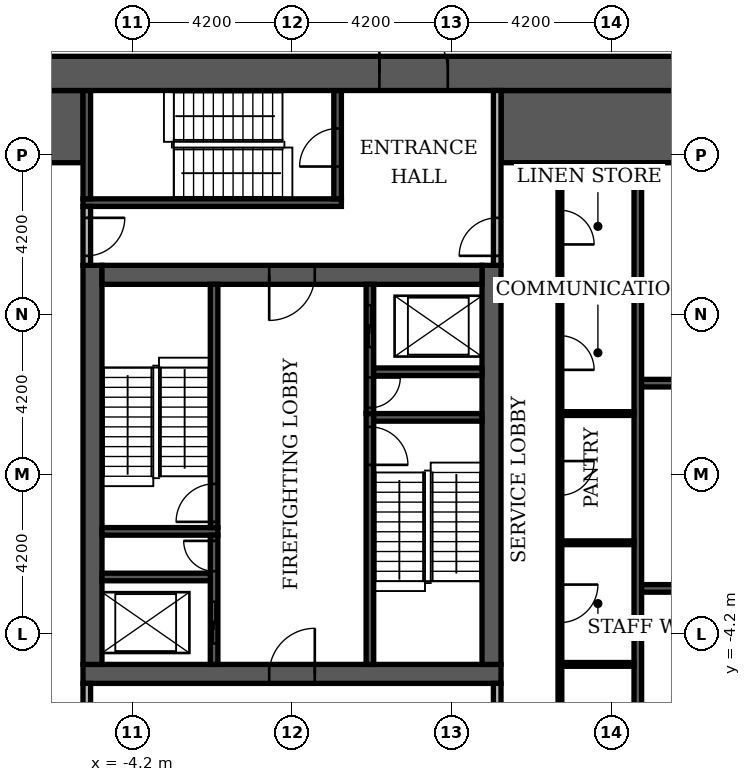
"""IFC4 building model, lengths in metres.
Left out: names, types, materials, properties, quantities, classifications, styles, units other than length and angle.
Written with IfcOpenShell. Run it as: python <this file> out.ifc"""

import sys

from ifc_helpers import new_model, si_unit, direction, frame, frame_2d, origin, place, context, subcontext, project, spatial, rectangle, extrude, element, fill, save


model = new_model("IFC4")
c1 = context("Model", 3, precision=1e-05, world=origin(), true_north=direction((0.0, 1.0)))
c2 = subcontext(c1, "Body", "Model", "MODEL_VIEW")
j1 = project(units=[si_unit("LENGTHUNIT", "METRE"), si_unit("PLANEANGLEUNIT", "RADIAN")], contexts=[c1])
p1 = place(None, origin())
s1 = spatial("IfcSite", under=j1, at=p1, CompositionType="ELEMENT")
p2 = place(p1, origin())
s2 = spatial("IfcBuilding", under=s1, at=p2, CompositionType="ELEMENT")
p3 = place(p2, frame((0.0, 0.0, -8.4)))
s3 = spatial("IfcBuildingStorey", under=s2, at=p3, CompositionType="ELEMENT", Elevation=-8.4)
p4 = place(p3, frame((-5.5, -5.25, 0.0), z_axis=(0.0, 0.0, 1.0), x_axis=(1.0, 0.0, 0.0)))
e1 = element("IfcWall", 1, at=p4, inside=s3, PredefinedType="SHEAR", context=c2, shape_type="SweptSolid", body=[
    extrude(rectangle(XDim=11.0, YDim=0.5, at=frame_2d((5.5, 0.0))), origin(), (0.0, 0.0, 1.0), 3.85),
])
p5 = place(p4, frame((4.9, 0.0, 0.0)))
e2 = element("IfcOpeningElement", 2, at=p5, cuts=e1, PredefinedType="OPENING", context=c2, shape_type="SweptSolid", body=[
    extrude(rectangle(XDim=1.2, YDim=2.1, at=frame_2d((0.6, 1.05))), frame((0.0, 0.26, 0.0), z_axis=(0.0, -1.0, 0.0), x_axis=(1.0, 0.0, 0.0)), (0.0, 0.0, 1.0), 0.52),
])
for number, where, z_axis, x_axis in (
    (3, (-5.25, -5.0, 0.0), (0.0, 0.0, 1.0), (0.0, 1.0, 0.0)),
    (4, (5.25, -5.0, 0.0), (0.0, 0.0, 1.0), (0.0, 1.0, 0.0)),
):
    element("IfcWall", number, at=place(p3, frame(where, z_axis=z_axis, x_axis=x_axis)), inside=s3, PredefinedType="SHEAR", context=c2, shape_type="SweptSolid", body=[
        extrude(rectangle(XDim=10.5, YDim=0.5, at=frame_2d((5.25, 0.0))), origin(), (0.0, 0.0, 1.0), 3.85),
    ])
p6 = place(p3, frame((-5.0, 5.25, 0.0), z_axis=(0.0, 0.0, 1.0), x_axis=(1.0, 0.0, 0.0)))
e5 = element("IfcWall", 5, at=p6, inside=s3, PredefinedType="SHEAR", context=c2, shape_type="SweptSolid", body=[
    extrude(rectangle(XDim=10.0, YDim=0.5, at=frame_2d((5.0, 0.0))), origin(), (0.0, 0.0, 1.0), 3.85),
])
p7 = place(p6, frame((4.4, 0.0, 0.0)))
e6 = element("IfcOpeningElement", 6, at=p7, cuts=e5, PredefinedType="OPENING", context=c2, shape_type="SweptSolid", body=[
    extrude(rectangle(XDim=1.2, YDim=2.1, at=frame_2d((0.6, 1.05))), frame((0.0, 0.26, 0.0), z_axis=(0.0, -1.0, 0.0), x_axis=(1.0, 0.0, 0.0)), (0.0, 0.0, 1.0), 0.52),
])
for number, where, z_axis, x_axis in (
    (7, (-10.1, 9.15, 0.0), (0.0, 0.0, 1.0), (1.0, 0.0, 0.0)),
    (8, (5.5, 9.15, 0.0), (0.0, 0.0, 1.0), (1.0, 0.0, 0.0)),
):
    element("IfcWall", number, at=place(p3, frame(where, z_axis=z_axis, x_axis=x_axis)), inside=s3, PredefinedType="SHEAR", context=c2, shape_type="SweptSolid", body=[
        extrude(rectangle(XDim=4.6, YDim=1.9, at=frame_2d((2.3, 0.0))), origin(), (0.0, 0.0, 1.0), 3.85),
    ])
p8 = place(p3, frame((2.05, -5.0, 0.0), z_axis=(0.0, 0.0, 1.0), x_axis=(0.0, 1.0, 0.0)))
e9 = element("IfcWall", 9, at=p8, inside=s3, PredefinedType="SHEAR", context=c2, shape_type="SweptSolid", body=[
    extrude(rectangle(XDim=6.6, YDim=0.2, at=frame_2d((3.3, 0.0))), origin(), (0.0, 0.0, 1.0), 3.85),
])
p9 = place(p8, frame((5.25, 0.0, 0.0)))
e10 = element("IfcOpeningElement", 10, at=p9, cuts=e9, PredefinedType="OPENING", context=c2, shape_type="SweptSolid", body=[
    extrude(rectangle(XDim=1.0, YDim=2.1, at=frame_2d((0.5, 1.05))), frame((0.0, 0.11, 0.0), z_axis=(0.0, -1.0, 0.0), x_axis=(1.0, 0.0, 0.0)), (0.0, 0.0, 1.0), 0.22),
])
p10 = place(p3, frame((-5.0, -1.5, 0.0), z_axis=(0.0, 0.0, 1.0), x_axis=(1.0, 0.0, 0.0)))
e11 = element("IfcWall", 11, at=p10, inside=s3, PredefinedType="SHEAR", context=c2, shape_type="SweptSolid", body=[
    extrude(rectangle(XDim=3.05, YDim=0.2, at=frame_2d((1.525, 0.0))), origin(), (0.0, 0.0, 1.0), 3.85),
])
p11 = place(p3, frame((-2.05, -1.4, 0.0), z_axis=(0.0, 0.0, 1.0), x_axis=(0.0, 1.0, 0.0)))
e12 = element("IfcWall", 12, at=p11, inside=s3, PredefinedType="SHEAR", context=c2, shape_type="SweptSolid", body=[
    extrude(rectangle(XDim=6.4, YDim=0.2, at=frame_2d((3.2, 0.0))), origin(), (0.0, 0.0, 1.0), 3.85),
])
p12 = place(p11, frame((0.15, 0.0, 0.0)))
e13 = element("IfcOpeningElement", 13, at=p12, cuts=e12, PredefinedType="OPENING", context=c2, shape_type="SweptSolid", body=[
    extrude(rectangle(XDim=1.0, YDim=2.1, at=frame_2d((0.5, 1.05))), frame((0.0, 0.11, 0.0), z_axis=(0.0, -1.0, 0.0), x_axis=(1.0, 0.0, 0.0)), (0.0, 0.0, 1.0), 0.22),
])
p13 = place(p3, frame((2.15, 1.5, 0.0), z_axis=(0.0, 0.0, 1.0), x_axis=(1.0, 0.0, 0.0)))
e14 = element("IfcWall", 14, at=p13, inside=s3, PredefinedType="SHEAR", context=c2, shape_type="SweptSolid", body=[
    extrude(rectangle(XDim=2.85, YDim=0.2, at=frame_2d((1.425, 0.0))), origin(), (0.0, 0.0, 1.0), 3.85),
])
p14 = place(p3, frame((-5.5, 7.15, 0.0), z_axis=(0.0, 0.0, 1.0), x_axis=(1.0, 0.0, 0.0)))
e15 = element("IfcWall", 15, at=p14, inside=s3, PredefinedType="SHEAR", context=c2, shape_type="SweptSolid", body=[
    extrude(rectangle(XDim=6.8, YDim=0.2, at=frame_2d((3.4, 0.0))), origin(), (0.0, 0.0, 1.0), 3.85),
])
p15 = place(p3, frame((-5.4, 7.25, 0.0), z_axis=(0.0, 0.0, 1.0), x_axis=(0.0, 1.0, 0.0)))
e16 = element("IfcWall", 16, at=p15, inside=s3, PredefinedType="SHEAR", context=c2, shape_type="SweptSolid", body=[
    extrude(rectangle(XDim=2.85, YDim=0.2, at=frame_2d((1.425, 0.0))), origin(), (0.0, 0.0, 1.0), 3.85),
])
p16 = place(p3, frame((1.2, 7.25, 0.0), z_axis=(0.0, 0.0, 1.0), x_axis=(0.0, 1.0, 0.0)))
e17 = element("IfcWall", 17, at=p16, inside=s3, PredefinedType="SHEAR", context=c2, shape_type="SweptSolid", body=[
    extrude(rectangle(XDim=2.85, YDim=0.2, at=frame_2d((1.425, 0.0))), origin(), (0.0, 0.0, 1.0), 3.85),
])
p17 = place(p16, frame((0.85, 0.0, 0.0)))
e18 = element("IfcOpeningElement", 18, at=p17, cuts=e17, PredefinedType="OPENING", context=c2, shape_type="SweptSolid", body=[
    extrude(rectangle(XDim=1.0, YDim=2.1, at=frame_2d((0.5, 1.05))), frame((0.0, 0.11, 0.0), z_axis=(0.0, -1.0, 0.0), x_axis=(1.0, 0.0, 0.0)), (0.0, 0.0, 1.0), 0.22),
])
p18 = place(p3, frame((9.1, -8.2, 0.0), z_axis=(0.0, 0.0, 1.0), x_axis=(0.0, 1.0, 0.0)))
e19 = element("IfcWall", 19, at=p18, inside=s3, PredefinedType="SHEAR", context=c2, shape_type="SweptSolid", body=[
    extrude(rectangle(XDim=16.4, YDim=0.2, at=frame_2d((8.2, 0.0))), origin(), (0.0, 0.0, 1.0), 3.85),
])
p19 = place(p3, frame((-2.05, -5.0, 0.0), z_axis=(0.0, 0.0, 1.0), x_axis=(0.0, 1.0, 0.0)))
e20 = element("IfcWall", 20, at=p19, inside=s3, PredefinedType="SHEAR", context=c2, shape_type="SweptSolid", body=[
    extrude(rectangle(XDim=3.4, YDim=0.2, at=frame_2d((1.7, 0.0))), origin(), (0.0, 0.0, 1.0), 3.85),
])
p20 = place(p19, frame((0.55, 0.0, 0.0)))
e21 = element("IfcOpeningElement", 21, at=p20, cuts=e20, PredefinedType="OPENING", context=c2, shape_type="SweptSolid", body=[
    extrude(rectangle(XDim=1.1, YDim=2.1, at=frame_2d((0.55, 1.05))), frame((0.0, 0.11, 0.0), z_axis=(0.0, -1.0, 0.0), x_axis=(1.0, 0.0, 0.0)), (0.0, 0.0, 1.0), 0.22),
])
p21 = place(p19, frame((2.45, 0.0, 0.0)))
e22 = element("IfcOpeningElement", 22, at=p21, cuts=e20, PredefinedType="OPENING", context=c2, shape_type="SweptSolid", body=[
    extrude(rectangle(XDim=0.8, YDim=2.1, at=frame_2d((0.4, 1.05))), frame((0.0, 0.11, 0.0), z_axis=(0.0, -1.0, 0.0), x_axis=(1.0, 0.0, 0.0)), (0.0, 0.0, 1.0), 0.22),
])
p22 = place(p3, frame((9.2, -3.0, 0.0), z_axis=(0.0, 0.0, 1.0), x_axis=(1.0, 0.0, 0.0)))
e23 = element("IfcWall", 23, at=p22, inside=s3, PredefinedType="SHEAR", context=c2, shape_type="SweptSolid", body=[
    extrude(rectangle(XDim=0.9, YDim=0.2, at=frame_2d((0.45, 0.0))), origin(), (0.0, 0.0, 1.0), 3.85),
])
p23 = place(p3, frame((-5.0, -2.7, 0.0), z_axis=(0.0, 0.0, 1.0), x_axis=(1.0, 0.0, 0.0)))
e24 = element("IfcWall", 24, at=p23, inside=s3, PredefinedType="SHEAR", context=c2, shape_type="SweptSolid", body=[
    extrude(rectangle(XDim=2.85, YDim=0.2, at=frame_2d((1.425, 0.0))), origin(), (0.0, 0.0, 1.0), 3.85),
])
p24 = place(p3, frame((2.05, 1.6, 0.0), z_axis=(0.0, 0.0, 1.0), x_axis=(0.0, 1.0, 0.0)))
e25 = element("IfcWall", 25, at=p24, inside=s3, PredefinedType="SHEAR", context=c2, shape_type="SweptSolid", body=[
    extrude(rectangle(XDim=3.4, YDim=0.2, at=frame_2d((1.7, 0.0))), origin(), (0.0, 0.0, 1.0), 3.85),
])
p25 = place(p24, frame((1.75, 0.0, 0.0)))
e26 = element("IfcOpeningElement", 26, at=p25, cuts=e25, PredefinedType="OPENING", context=c2, shape_type="SweptSolid", body=[
    extrude(rectangle(XDim=1.1, YDim=2.1, at=frame_2d((0.55, 1.05))), frame((0.0, 0.11, 0.0), z_axis=(0.0, -1.0, 0.0), x_axis=(1.0, 0.0, 0.0)), (0.0, 0.0, 1.0), 0.22),
])
p26 = place(p24, frame((0.15, 0.0, 0.0)))
e27 = element("IfcOpeningElement", 27, at=p26, cuts=e25, PredefinedType="OPENING", context=c2, shape_type="SweptSolid", body=[
    extrude(rectangle(XDim=0.8, YDim=2.1, at=frame_2d((0.4, 1.05))), frame((0.0, 0.11, 0.0), z_axis=(0.0, -1.0, 0.0), x_axis=(1.0, 0.0, 0.0)), (0.0, 0.0, 1.0), 0.22),
])
p27 = place(p3, frame((9.2, 2.4, 0.0), z_axis=(0.0, 0.0, 1.0), x_axis=(1.0, 0.0, 0.0)))
e28 = element("IfcWall", 28, at=p27, inside=s3, PredefinedType="SHEAR", context=c2, shape_type="SweptSolid", body=[
    extrude(rectangle(XDim=0.9, YDim=0.2, at=frame_2d((0.45, 0.0))), origin(), (0.0, 0.0, 1.0), 3.85),
])
p28 = place(p3, frame((2.15, 2.7, 0.0), z_axis=(0.0, 0.0, 1.0), x_axis=(1.0, 0.0, 0.0)))
e29 = element("IfcWall", 29, at=p28, inside=s3, PredefinedType="SHEAR", context=c2, shape_type="SweptSolid", body=[
    extrude(rectangle(XDim=2.85, YDim=0.2, at=frame_2d((1.425, 0.0))), origin(), (0.0, 0.0, 1.0), 3.85),
])
p29 = place(p3, frame((-11.0, 10.55, 0.0), z_axis=(0.0, 0.0, 1.0), x_axis=(1.0, 0.0, 0.0)))
e30 = element("IfcWall", 30, at=p29, inside=s3, PredefinedType="SHEAR", context=c2, shape_type="SweptSolid", body=[
    extrude(rectangle(XDim=22.0, YDim=0.9, at=frame_2d((11.0, 0.0))), origin(), (0.0, 0.0, 1.0), 3.85),
])
p30 = place(p29, frame((13.3, 0.0, 0.0)))
e31 = element("IfcOpeningElement", 31, at=p30, cuts=e30, PredefinedType="OPENING", context=c2, shape_type="SweptSolid", body=[
    extrude(rectangle(XDim=1.8, YDim=2.2, at=frame_2d((0.9, 1.1))), frame((0.0, 0.46, 0.0), z_axis=(0.0, -1.0, 0.0), x_axis=(1.0, 0.0, 0.0)), (0.0, 0.0, 1.0), 0.92),
])
p31 = place(p3, frame((-5.4, -10.1, 0.0), z_axis=(0.0, 0.0, 1.0), x_axis=(0.0, 1.0, 0.0)))
e32 = element("IfcWall", 32, at=p31, inside=s3, PredefinedType="PARTITIONING", context=c2, shape_type="SweptSolid", body=[
    extrude(rectangle(XDim=4.6, YDim=0.2, at=frame_2d((2.3, 0.0))), origin(), (0.0, 0.0, 1.0), 3.85),
])
p32 = place(p31, frame((2.9, 0.0, 0.0)))
e33 = element("IfcOpeningElement", 33, at=p32, cuts=e32, PredefinedType="OPENING", context=c2, shape_type="SweptSolid", body=[
    extrude(rectangle(XDim=1.0, YDim=2.1, at=frame_2d((0.5, 1.05))), frame((0.0, 0.11, 0.0), z_axis=(0.0, -1.0, 0.0), x_axis=(1.0, 0.0, 0.0)), (0.0, 0.0, 1.0), 0.22),
])
p33 = place(p3, frame((5.4, -10.1, 0.0), z_axis=(0.0, 0.0, 1.0), x_axis=(0.0, 1.0, 0.0)))
e34 = element("IfcWall", 34, at=p33, inside=s3, PredefinedType="PARTITIONING", context=c2, shape_type="SweptSolid", body=[
    extrude(rectangle(XDim=4.6, YDim=0.2, at=frame_2d((2.3, 0.0))), origin(), (0.0, 0.0, 1.0), 3.85),
])
p34 = place(p33, frame((2.9, 0.0, 0.0)))
e35 = element("IfcOpeningElement", 35, at=p34, cuts=e34, PredefinedType="OPENING", context=c2, shape_type="SweptSolid", body=[
    extrude(rectangle(XDim=1.0, YDim=2.1, at=frame_2d((0.5, 1.05))), frame((0.0, 0.11, 0.0), z_axis=(0.0, -1.0, 0.0), x_axis=(1.0, 0.0, 0.0)), (0.0, 0.0, 1.0), 0.22),
])
p35 = place(p3, frame((7.05, -8.2, 0.0), z_axis=(0.0, 0.0, 1.0), x_axis=(0.0, 1.0, 0.0)))
e36 = element("IfcWall", 36, at=p35, inside=s3, PredefinedType="PARTITIONING", context=c2, shape_type="SweptSolid", body=[
    extrude(rectangle(XDim=16.4, YDim=0.1, at=frame_2d((8.2, 0.0))), origin(), (0.0, 0.0, 1.0), 3.85),
])
p36 = place(p35, frame((1.15, 0.0, 0.0)))
e37 = element("IfcOpeningElement", 37, at=p36, cuts=e36, PredefinedType="OPENING", context=c2, shape_type="SweptSolid", body=[
    extrude(rectangle(XDim=0.9, YDim=2.1, at=frame_2d((0.45, 1.05))), frame((0.0, 0.06, 0.0), z_axis=(0.0, -1.0, 0.0), x_axis=(1.0, 0.0, 0.0)), (0.0, 0.0, 1.0), 0.12),
])
p37 = place(p35, frame((4.3, 0.0, 0.0)))
e38 = element("IfcOpeningElement", 38, at=p37, cuts=e36, PredefinedType="OPENING", context=c2, shape_type="SweptSolid", body=[
    extrude(rectangle(XDim=1.0, YDim=2.1, at=frame_2d((0.5, 1.05))), frame((0.0, 0.06, 0.0), z_axis=(0.0, -1.0, 0.0), x_axis=(1.0, 0.0, 0.0)), (0.0, 0.0, 1.0), 0.12),
])
p38 = place(p35, frame((7.65, 0.0, 0.0)))
e39 = element("IfcOpeningElement", 39, at=p38, cuts=e36, PredefinedType="OPENING", context=c2, shape_type="SweptSolid", body=[
    extrude(rectangle(XDim=0.9, YDim=2.1, at=frame_2d((0.45, 1.05))), frame((0.0, 0.06, 0.0), z_axis=(0.0, -1.0, 0.0), x_axis=(1.0, 0.0, 0.0)), (0.0, 0.0, 1.0), 0.12),
])
p39 = place(p35, frame((10.95, 0.0, 0.0)))
e40 = element("IfcOpeningElement", 40, at=p39, cuts=e36, PredefinedType="OPENING", context=c2, shape_type="SweptSolid", body=[
    extrude(rectangle(XDim=0.9, YDim=2.1, at=frame_2d((0.45, 1.05))), frame((0.0, 0.06, 0.0), z_axis=(0.0, -1.0, 0.0), x_axis=(1.0, 0.0, 0.0)), (0.0, 0.0, 1.0), 0.12),
])
p40 = place(p35, frame((14.25, 0.0, 0.0)))
e41 = element("IfcOpeningElement", 41, at=p40, cuts=e36, PredefinedType="OPENING", context=c2, shape_type="SweptSolid", body=[
    extrude(rectangle(XDim=0.9, YDim=2.1, at=frame_2d((0.45, 1.05))), frame((0.0, 0.06, 0.0), z_axis=(0.0, -1.0, 0.0), x_axis=(1.0, 0.0, 0.0)), (0.0, 0.0, 1.0), 0.12),
])
for number, where, z_axis, x_axis in (
    (42, (7.1, -5.0, 0.0), (0.0, 0.0, 1.0), (1.0, 0.0, 0.0)),
    (43, (7.1, -1.8, 0.0), (0.0, 0.0, 1.0), (1.0, 0.0, 0.0)),
    (44, (7.1, 1.6, 0.0), (0.0, 0.0, 1.0), (1.0, 0.0, 0.0)),
    (45, (7.1, 4.8, 0.0), (0.0, 0.0, 1.0), (1.0, 0.0, 0.0)),
):
    element("IfcWall", number, at=place(p3, frame(where, z_axis=z_axis, x_axis=x_axis)), inside=s3, PredefinedType="PARTITIONING", context=c2, shape_type="SweptSolid", body=[
        extrude(rectangle(XDim=1.9, YDim=0.1, at=frame_2d((0.95, 0.0))), origin(), (0.0, 0.0, 1.0), 3.85),
    ])
p41 = place(p3, frame((-5.4, 5.5, 0.0), z_axis=(0.0, 0.0, 1.0), x_axis=(0.0, 1.0, 0.0)))
e46 = element("IfcWall", 46, at=p41, inside=s3, PredefinedType="PARTITIONING", context=c2, shape_type="SweptSolid", body=[
    extrude(rectangle(XDim=1.55, YDim=0.2, at=frame_2d((0.775, 0.0))), origin(), (0.0, 0.0, 1.0), 3.85),
])
p42 = place(p41, frame((0.25, 0.0, 0.0)))
e47 = element("IfcOpeningElement", 47, at=p42, cuts=e46, PredefinedType="OPENING", context=c2, shape_type="SweptSolid", body=[
    extrude(rectangle(XDim=1.0, YDim=2.1, at=frame_2d((0.5, 1.05))), frame((0.0, 0.11, 0.0), z_axis=(0.0, -1.0, 0.0), x_axis=(1.0, 0.0, 0.0)), (0.0, 0.0, 1.0), 0.22),
])
p43 = place(p3, frame((5.4, 5.5, 0.0), z_axis=(0.0, 0.0, 1.0), x_axis=(0.0, 1.0, 0.0)))
e48 = element("IfcWall", 48, at=p43, inside=s3, PredefinedType="PARTITIONING", context=c2, shape_type="SweptSolid", body=[
    extrude(rectangle(XDim=4.6, YDim=0.2, at=frame_2d((2.3, 0.0))), origin(), (0.0, 0.0, 1.0), 3.85),
])
p44 = place(p43, frame((0.25, 0.0, 0.0)))
e49 = element("IfcOpeningElement", 49, at=p44, cuts=e48, PredefinedType="OPENING", context=c2, shape_type="SweptSolid", body=[
    extrude(rectangle(XDim=1.0, YDim=2.1, at=frame_2d((0.5, 1.05))), frame((0.0, 0.11, 0.0), z_axis=(0.0, -1.0, 0.0), x_axis=(1.0, 0.0, 0.0)), (0.0, 0.0, 1.0), 0.22),
])
p45 = place(p25, origin())
e50 = element("IfcDoor", 50, at=p45, inside=s3, OperationType="SLIDING_TO_LEFT", PredefinedType="DOOR", context=c2, shape_type="SweptSolid", body=[
    extrude(rectangle(XDim=1.1, YDim=2.1, at=frame_2d((0.55, 1.05))), frame((0.0, 0.025, 0.0), z_axis=(0.0, -1.0, 0.0), x_axis=(1.0, 0.0, 0.0)), (0.0, 0.0, 1.0), 0.05),
])
fill(e26, e50)
p46 = place(p20, origin())
e51 = element("IfcDoor", 51, at=p46, inside=s3, OperationType="SLIDING_TO_LEFT", PredefinedType="DOOR", context=c2, shape_type="SweptSolid", body=[
    extrude(rectangle(XDim=1.1, YDim=2.1, at=frame_2d((0.55, 1.05))), frame((0.0, 0.025, 0.0), z_axis=(0.0, -1.0, 0.0), x_axis=(1.0, 0.0, 0.0)), (0.0, 0.0, 1.0), 0.05),
])
fill(e21, e51)
p47 = place(p12, origin())
e52 = element("IfcDoor", 52, at=p47, inside=s3, OperationType="SINGLE_SWING_LEFT", PredefinedType="DOOR", context=c2, shape_type="SweptSolid", body=[
    extrude(rectangle(XDim=1.0, YDim=2.1, at=frame_2d((0.5, 1.05))), frame((0.0, 0.025, 0.0), z_axis=(0.0, -1.0, 0.0), x_axis=(1.0, 0.0, 0.0)), (0.0, 0.0, 1.0), 0.05),
])
fill(e13, e52)
p48 = place(p9, frame((1.0, 0.0, 0.0), z_axis=(0.0, 0.0, 1.0), x_axis=(-1.0, 0.0, 0.0)))
e53 = element("IfcDoor", 53, at=p48, inside=s3, OperationType="SINGLE_SWING_LEFT", PredefinedType="DOOR", context=c2, shape_type="SweptSolid", body=[
    extrude(rectangle(XDim=1.0, YDim=2.1, at=frame_2d((0.5, 1.05))), frame((0.0, 0.025, 0.0), z_axis=(0.0, -1.0, 0.0), x_axis=(1.0, 0.0, 0.0)), (0.0, 0.0, 1.0), 0.05),
])
fill(e10, e53)
p49 = place(p26, frame((0.8, 0.0, 0.0), z_axis=(0.0, 0.0, 1.0), x_axis=(-1.0, 0.0, 0.0)))
e54 = element("IfcDoor", 54, at=p49, inside=s3, OperationType="SINGLE_SWING_RIGHT", PredefinedType="DOOR", context=c2, shape_type="SweptSolid", body=[
    extrude(rectangle(XDim=0.8, YDim=2.1, at=frame_2d((0.4, 1.05))), frame((0.0, 0.025, 0.0), z_axis=(0.0, -1.0, 0.0), x_axis=(1.0, 0.0, 0.0)), (0.0, 0.0, 1.0), 0.05),
])
fill(e27, e54)
p50 = place(p21, origin())
e55 = element("IfcDoor", 55, at=p50, inside=s3, OperationType="SINGLE_SWING_RIGHT", PredefinedType="DOOR", context=c2, shape_type="SweptSolid", body=[
    extrude(rectangle(XDim=0.8, YDim=2.1, at=frame_2d((0.4, 1.05))), frame((0.0, 0.025, 0.0), z_axis=(0.0, -1.0, 0.0), x_axis=(1.0, 0.0, 0.0)), (0.0, 0.0, 1.0), 0.05),
])
fill(e22, e55)
p51 = place(p7, frame((1.2, 0.0, 0.0), z_axis=(0.0, 0.0, 1.0), x_axis=(-1.0, 0.0, 0.0)))
e56 = element("IfcDoor", 56, at=p51, inside=s3, OperationType="SINGLE_SWING_LEFT", PredefinedType="DOOR", context=c2, shape_type="SweptSolid", body=[
    extrude(rectangle(XDim=1.2, YDim=2.1, at=frame_2d((0.6, 1.05))), frame((0.0, 0.025, 0.0), z_axis=(0.0, -1.0, 0.0), x_axis=(1.0, 0.0, 0.0)), (0.0, 0.0, 1.0), 0.05),
])
fill(e6, e56)
p52 = place(p5, origin())
e57 = element("IfcDoor", 57, at=p52, inside=s3, OperationType="SINGLE_SWING_RIGHT", PredefinedType="DOOR", context=c2, shape_type="SweptSolid", body=[
    extrude(rectangle(XDim=1.2, YDim=2.1, at=frame_2d((0.6, 1.05))), frame((0.0, 0.025, 0.0), z_axis=(0.0, -1.0, 0.0), x_axis=(1.0, 0.0, 0.0)), (0.0, 0.0, 1.0), 0.05),
])
fill(e2, e57)
p53 = place(p17, origin())
e58 = element("IfcDoor", 58, at=p53, inside=s3, OperationType="SINGLE_SWING_LEFT", PredefinedType="DOOR", context=c2, shape_type="SweptSolid", body=[
    extrude(rectangle(XDim=1.0, YDim=2.1, at=frame_2d((0.5, 1.05))), frame((0.0, 0.025, 0.0), z_axis=(0.0, -1.0, 0.0), x_axis=(1.0, 0.0, 0.0)), (0.0, 0.0, 1.0), 0.05),
])
fill(e18, e58)
p54 = place(p42, frame((1.0, 0.0, 0.0), z_axis=(0.0, 0.0, 1.0), x_axis=(-1.0, 0.0, 0.0)))
e59 = element("IfcDoor", 59, at=p54, inside=s3, OperationType="SINGLE_SWING_RIGHT", PredefinedType="DOOR", context=c2, shape_type="SweptSolid", body=[
    extrude(rectangle(XDim=1.0, YDim=2.1, at=frame_2d((0.5, 1.05))), frame((0.0, 0.025, 0.0), z_axis=(0.0, -1.0, 0.0), x_axis=(1.0, 0.0, 0.0)), (0.0, 0.0, 1.0), 0.05),
])
fill(e47, e59)
p55 = place(p44, origin())
e60 = element("IfcDoor", 60, at=p55, inside=s3, OperationType="SINGLE_SWING_LEFT", PredefinedType="DOOR", context=c2, shape_type="SweptSolid", body=[
    extrude(rectangle(XDim=1.0, YDim=2.1, at=frame_2d((0.5, 1.05))), frame((0.0, 0.025, 0.0), z_axis=(0.0, -1.0, 0.0), x_axis=(1.0, 0.0, 0.0)), (0.0, 0.0, 1.0), 0.05),
])
fill(e49, e60)
p56 = place(p30, origin())
e61 = element("IfcDoor", 61, at=p56, inside=s3, OperationType="DOUBLE_DOOR_SINGLE_SWING", PredefinedType="DOOR", context=c2, shape_type="SweptSolid", body=[
    extrude(rectangle(XDim=1.8, YDim=2.2, at=frame_2d((0.9, 1.1))), frame((0.0, 0.025, 0.0), z_axis=(0.0, -1.0, 0.0), x_axis=(1.0, 0.0, 0.0)), (0.0, 0.0, 1.0), 0.05),
])
fill(e31, e61)
p57 = place(p37, frame((1.0, 0.0, 0.0), z_axis=(0.0, 0.0, 1.0), x_axis=(-1.0, 0.0, 0.0)))
e62 = element("IfcDoor", 62, at=p57, inside=s3, OperationType="SINGLE_SWING_RIGHT", PredefinedType="DOOR", context=c2, shape_type="SweptSolid", body=[
    extrude(rectangle(XDim=1.0, YDim=2.1, at=frame_2d((0.5, 1.05))), frame((0.0, 0.025, 0.0), z_axis=(0.0, -1.0, 0.0), x_axis=(1.0, 0.0, 0.0)), (0.0, 0.0, 1.0), 0.05),
])
fill(e38, e62)
p58 = place(p38, frame((0.9, 0.0, 0.0), z_axis=(0.0, 0.0, 1.0), x_axis=(-1.0, 0.0, 0.0)))
e63 = element("IfcDoor", 63, at=p58, inside=s3, OperationType="SINGLE_SWING_RIGHT", PredefinedType="DOOR", context=c2, shape_type="SweptSolid", body=[
    extrude(rectangle(XDim=0.9, YDim=2.1, at=frame_2d((0.45, 1.05))), frame((0.0, 0.025, 0.0), z_axis=(0.0, -1.0, 0.0), x_axis=(1.0, 0.0, 0.0)), (0.0, 0.0, 1.0), 0.05),
])
fill(e39, e63)
p59 = place(p39, frame((0.9, 0.0, 0.0), z_axis=(0.0, 0.0, 1.0), x_axis=(-1.0, 0.0, 0.0)))
e64 = element("IfcDoor", 64, at=p59, inside=s3, OperationType="SINGLE_SWING_LEFT", PredefinedType="DOOR", context=c2, shape_type="SweptSolid", body=[
    extrude(rectangle(XDim=0.9, YDim=2.1, at=frame_2d((0.45, 1.05))), frame((0.0, 0.025, 0.0), z_axis=(0.0, -1.0, 0.0), x_axis=(1.0, 0.0, 0.0)), (0.0, 0.0, 1.0), 0.05),
])
fill(e40, e64)
p60 = place(p40, frame((0.9, 0.0, 0.0), z_axis=(0.0, 0.0, 1.0), x_axis=(-1.0, 0.0, 0.0)))
e65 = element("IfcDoor", 65, at=p60, inside=s3, OperationType="SINGLE_SWING_LEFT", PredefinedType="DOOR", context=c2, shape_type="SweptSolid", body=[
    extrude(rectangle(XDim=0.9, YDim=2.1, at=frame_2d((0.45, 1.05))), frame((0.0, 0.025, 0.0), z_axis=(0.0, -1.0, 0.0), x_axis=(1.0, 0.0, 0.0)), (0.0, 0.0, 1.0), 0.05),
])
fill(e41, e65)
save(model, sys.argv[1])
